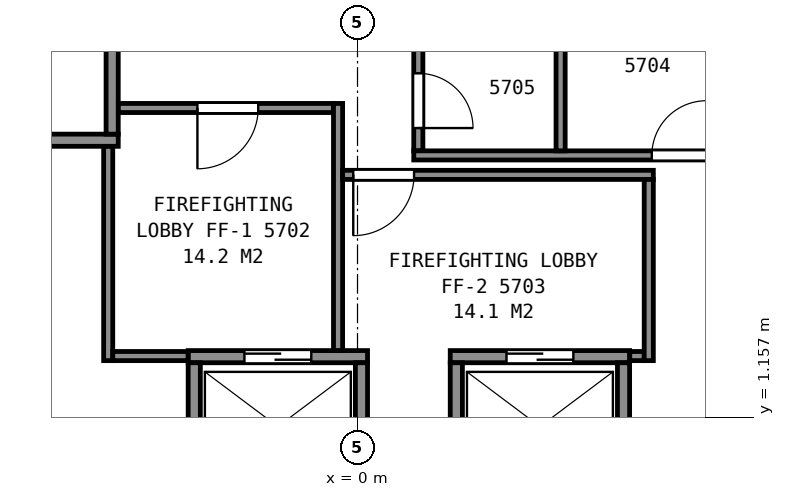
"""IFC4 building model, lengths in metres.
Left out: names, types, materials, properties, quantities, classifications, styles, units other than length and angle.
Written with IfcOpenShell. Run it as: python <this file> out.ifc"""

import sys

from ifc_helpers import new_model, si_unit, direction, frame, frame_2d, origin, place, context, subcontext, project, spatial, rectangle, extrude, element, fill, save


model = new_model("IFC4")
c1 = context("Model", 3, precision=1e-05, world=origin(), true_north=direction((0.0, 1.0)))
c2 = subcontext(c1, "Body", "Model", "MODEL_VIEW")
j1 = project(units=[si_unit("LENGTHUNIT", "METRE"), si_unit("PLANEANGLEUNIT", "RADIAN")], contexts=[c1])
p1 = place(None, origin())
s1 = spatial("IfcSite", under=j1, at=p1, CompositionType="ELEMENT")
p2 = place(p1, origin())
s2 = spatial("IfcBuilding", under=s1, at=p2, CompositionType="ELEMENT")
p3 = place(p2, frame((0.0, 0.0, 228.6)))
s3 = spatial("IfcBuildingStorey", under=s2, at=p3, CompositionType="ELEMENT", Elevation=228.6)
p4 = place(p3, frame((-2.785, 2.15, 0.0), z_axis=(0.0, 0.0, 1.0), x_axis=(1.0, 0.0, 0.0)))
e1 = element("IfcWall", 1, at=p4, inside=s3, PredefinedType="PARTITIONING", context=c2, shape_type="SweptSolid", body=[
    extrude(rectangle(XDim=2.95, YDim=0.2, at=frame_2d((1.475, 0.0))), origin(), (0.0, 0.0, 1.0), 3.7),
])
p5 = place(p4, frame((0.925, 0.0, 0.0)))
e2 = element("IfcOpeningElement", 2, at=p5, cuts=e1, PredefinedType="OPENING", context=c2, shape_type="SweptSolid", body=[
    extrude(rectangle(XDim=1.1, YDim=2.1, at=frame_2d((0.55, 1.05))), frame((0.0, 0.11, 0.0), z_axis=(0.0, -1.0, 0.0), x_axis=(1.0, 0.0, 0.0)), (0.0, 0.0, 1.0), 0.22),
])
p6 = place(p3, frame((1.525, 2.15, 0.0), z_axis=(0.0, 0.0, 1.0), x_axis=(1.0, 0.0, 0.0)))
e3 = element("IfcWall", 3, at=p6, inside=s3, PredefinedType="PARTITIONING", context=c2, shape_type="SweptSolid", body=[
    extrude(rectangle(XDim=2.95, YDim=0.2, at=frame_2d((1.475, 0.0))), origin(), (0.0, 0.0, 1.0), 3.7),
])
p7 = place(p6, frame((0.925, 0.0, 0.0)))
e4 = element("IfcOpeningElement", 4, at=p7, cuts=e3, PredefinedType="OPENING", context=c2, shape_type="SweptSolid", body=[
    extrude(rectangle(XDim=1.1, YDim=2.1, at=frame_2d((0.55, 1.05))), frame((0.0, 0.11, 0.0), z_axis=(0.0, -1.0, 0.0), x_axis=(1.0, 0.0, 0.0)), (0.0, 0.0, 1.0), 0.22),
])
p8 = place(p3, frame((-6.285, 5.71, 0.0), z_axis=(0.0, 0.0, 1.0), x_axis=(1.0, 0.0, 0.0)))
e5 = element("IfcWall", 5, at=p8, inside=s3, PredefinedType="PARTITIONING", context=c2, shape_type="SweptSolid", body=[
    extrude(rectangle(XDim=2.35, YDim=0.2, at=frame_2d((1.175, 0.0))), origin(), (0.0, 0.0, 1.0), 3.7),
])
p9 = place(p3, frame((5.663, -1.612, 0.0), z_axis=(0.0, 0.0, 1.0), x_axis=(0.49998122708, 0.866036242063, 0.0)))
e6 = element("IfcWall", 6, at=p9, inside=s3, PredefinedType="PARTITIONING", context=c2, shape_type="SweptSolid", body=[
    extrude(rectangle(XDim=4.9, YDim=0.2, at=frame_2d((2.45, 0.0))), origin(), (0.0, 0.0, 1.0), 3.7),
])
for number, where, z_axis, x_axis in (
    (7, (4.375, 0.1, 0.0), (0.0, 0.0, 1.0), (0.0, 1.0, 0.0)),
    (8, (1.625, 0.1, 0.0), (0.0, 0.0, 1.0), (0.0, 1.0, 0.0)),
    (9, (0.065, 0.1, 0.0), (0.0, 0.0, 1.0), (0.0, 1.0, 0.0)),
    (10, (-2.685, 0.1, 0.0), (0.0, 0.0, 1.0), (0.0, 1.0, 0.0)),
):
    element("IfcWall", number, at=place(p3, frame(where, z_axis=z_axis, x_axis=x_axis)), inside=s3, PredefinedType="PARTITIONING", context=c2, shape_type="SweptSolid", body=[
        extrude(rectangle(XDim=1.95, YDim=0.2, at=frame_2d((0.975, 0.0))), origin(), (0.0, 0.0, 1.0), 3.7),
    ])
p10 = place(p3, frame((-4.035, 5.81, 0.0), z_axis=(0.0, 0.0, 1.0), x_axis=(0.0, 1.0, 0.0)))
e11 = element("IfcWall", 11, at=p10, inside=s3, PredefinedType="PARTITIONING", context=c2, shape_type="SweptSolid", body=[
    extrude(rectangle(XDim=1.75, YDim=0.2, at=frame_2d((0.875, 0.0))), origin(), (0.0, 0.0, 1.0), 3.7),
])
p11 = place(p3, frame((-4.1, 2.085, 0.0), z_axis=(0.0, 0.0, 1.0), x_axis=(0.0, 1.0, 0.0)))
e12 = element("IfcWall", 12, at=p11, inside=s3, PredefinedType="PARTITIONING", context=c2, shape_type="SweptSolid", body=[
    extrude(rectangle(XDim=3.523, YDim=0.15, at=frame_2d((1.761, 0.0))), origin(), (0.0, 0.0, 1.0), 3.45),
])
p12 = place(p3, frame((-4.025, 2.16, 0.0), z_axis=(0.0, 0.0, 1.0), x_axis=(1.0, 0.0, 0.0)))
e13 = element("IfcWall", 13, at=p12, inside=s3, PredefinedType="PARTITIONING", context=c2, shape_type="SweptSolid", body=[
    extrude(rectangle(XDim=1.238, YDim=0.15, at=frame_2d((0.619, 0.0))), origin(), (0.0, 0.0, 1.0), 3.45),
])
p13 = place(p3, frame((-3.933, 6.24, 0.0), z_axis=(0.0, 0.0, 1.0), x_axis=(1.0, 0.0, 0.0)))
e14 = element("IfcWall", 14, at=p13, inside=s3, PredefinedType="PARTITIONING", context=c2, shape_type="SweptSolid", body=[
    extrude(rectangle(XDim=3.538, YDim=0.15, at=frame_2d((1.769, 0.0))), origin(), (0.0, 0.0, 1.0), 3.45),
])
p14 = place(p13, frame((1.3, 0.0, 0.0)))
e15 = element("IfcOpeningElement", 15, at=p14, cuts=e14, PredefinedType="OPENING", context=c2, shape_type="SweptSolid", body=[
    extrude(rectangle(XDim=1.0, YDim=2.1, at=frame_2d((0.5, 1.05))), frame((0.0, 0.085, 0.0), z_axis=(0.0, -1.0, 0.0), x_axis=(1.0, 0.0, 0.0)), (0.0, 0.0, 1.0), 0.17),
])
p15 = place(p3, frame((-0.32, 2.252, 0.0), z_axis=(0.0, 0.0, 1.0), x_axis=(0.0, 1.0, 0.0)))
e16 = element("IfcWall", 16, at=p15, inside=s3, PredefinedType="PARTITIONING", context=c2, shape_type="SweptSolid", body=[
    extrude(rectangle(XDim=4.063, YDim=0.15, at=frame_2d((2.031, 0.0))), origin(), (0.0, 0.0, 1.0), 3.45),
])
p16 = place(p3, frame((-0.245, 5.14, 0.0), z_axis=(0.0, 0.0, 1.0), x_axis=(1.0, 0.0, 0.0)))
e17 = element("IfcWall", 17, at=p16, inside=s3, PredefinedType="PARTITIONING", context=c2, shape_type="SweptSolid", body=[
    extrude(rectangle(XDim=5.11, YDim=0.15, at=frame_2d((2.555, 0.0))), origin(), (0.0, 0.0, 1.0), 3.45),
])
p17 = place(p16, frame((0.175, 0.0, 0.0)))
e18 = element("IfcOpeningElement", 18, at=p17, cuts=e17, PredefinedType="OPENING", context=c2, shape_type="SweptSolid", body=[
    extrude(rectangle(XDim=1.0, YDim=2.1, at=frame_2d((0.5, 1.05))), frame((0.0, 0.085, 0.0), z_axis=(0.0, -1.0, 0.0), x_axis=(1.0, 0.0, 0.0)), (0.0, 0.0, 1.0), 0.17),
])
p18 = place(p3, frame((1.0, 7.56, 0.0), z_axis=(0.0, 0.0, 1.0), x_axis=(0.0, -1.0, 0.0)))
e19 = element("IfcWall", 19, at=p18, inside=s3, PredefinedType="PARTITIONING", context=c2, shape_type="SweptSolid", body=[
    extrude(rectangle(XDim=2.025, YDim=0.15, at=frame_2d((1.013, 0.0))), origin(), (0.0, 0.0, 1.0), 3.45),
])
p19 = place(p18, frame((0.75, 0.0, 0.0)))
e20 = element("IfcOpeningElement", 20, at=p19, cuts=e19, PredefinedType="OPENING", context=c2, shape_type="SweptSolid", body=[
    extrude(rectangle(XDim=0.9, YDim=2.1, at=frame_2d((0.45, 1.05))), frame((0.0, 0.085, 0.0), z_axis=(0.0, -1.0, 0.0), x_axis=(1.0, 0.0, 0.0)), (0.0, 0.0, 1.0), 0.17),
])
p20 = place(p3, frame((0.925, 5.46, 0.0), z_axis=(0.0, 0.0, 1.0), x_axis=(1.0, 0.0, 0.0)))
e21 = element("IfcWall", 21, at=p20, inside=s3, PredefinedType="PARTITIONING", context=c2, shape_type="SweptSolid", body=[
    extrude(rectangle(XDim=5.22, YDim=0.15, at=frame_2d((2.61, 0.0))), origin(), (0.0, 0.0, 1.0), 3.45),
])
p21 = place(p20, frame((3.915, 0.0, 0.0)))
e22 = element("IfcOpeningElement", 22, at=p21, cuts=e21, PredefinedType="OPENING", context=c2, shape_type="SweptSolid", body=[
    extrude(rectangle(XDim=0.9, YDim=2.1, at=frame_2d((0.45, 1.05))), frame((0.0, 0.085, 0.0), z_axis=(0.0, -1.0, 0.0), x_axis=(1.0, 0.0, 0.0)), (0.0, 0.0, 1.0), 0.17),
])
p22 = place(p3, frame((3.34, 5.535, 0.0), z_axis=(0.0, 0.0, 1.0), x_axis=(0.0, 1.0, 0.0)))
e23 = element("IfcWall", 23, at=p22, inside=s3, PredefinedType="PARTITIONING", context=c2, shape_type="SweptSolid", body=[
    extrude(rectangle(XDim=2.025, YDim=0.15, at=frame_2d((1.013, 0.0))), origin(), (0.0, 0.0, 1.0), 3.45),
])
p23 = place(p3, frame((4.477, 2.16, 0.0), z_axis=(0.0, 0.0, 1.0), x_axis=(1.0, 0.0, 0.0)))
e24 = element("IfcWall", 24, at=p23, inside=s3, PredefinedType="PARTITIONING", context=c2, shape_type="SweptSolid", body=[
    extrude(rectangle(XDim=0.238, YDim=0.15, at=frame_2d((0.119, 0.0))), origin(), (0.0, 0.0, 1.0), 3.45),
])
p24 = place(p3, frame((4.79, 2.085, 0.0), z_axis=(0.0, 0.0, 1.0), x_axis=(0.0, 1.0, 0.0)))
e25 = element("IfcWall", 25, at=p24, inside=s3, PredefinedType="PARTITIONING", context=c2, shape_type="SweptSolid", body=[
    extrude(rectangle(XDim=2.98, YDim=0.15, at=frame_2d((1.49, 0.0))), origin(), (0.0, 0.0, 1.0), 3.45),
])
p25 = place(p3, frame((-4.075, -12.545, 0.0), z_axis=(0.0, 0.0, 1.0), x_axis=(-0.499997769292, 0.86602669168, 0.0)))
e26 = element("IfcWall", 26, at=p25, inside=s3, PredefinedType="PARTITIONING", context=c2, shape_type="SweptSolid", body=[
    extrude(rectangle(XDim=17.706, YDim=0.2, at=frame_2d((8.853, 0.0))), origin(), (0.0, 0.0, 1.0), 2.713),
])
p26 = place(p25, frame((14.138, 0.0, 0.0)))
e27 = element("IfcOpeningElement", 27, at=p26, cuts=e26, PredefinedType="OPENING", context=c2, shape_type="SweptSolid", body=[
    extrude(rectangle(XDim=0.9, YDim=2.1, at=frame_2d((0.45, 1.05))), frame((0.0, 0.11, 0.0), z_axis=(0.0, -1.0, 0.0), x_axis=(1.0, 0.0, 0.0)), (0.0, 0.0, 1.0), 0.22),
])
p27 = place(p25, frame((11.328, 0.0, 0.0)))
e28 = element("IfcOpeningElement", 28, at=p27, cuts=e26, PredefinedType="OPENING", context=c2, shape_type="SweptSolid", body=[
    extrude(rectangle(XDim=0.9, YDim=2.1, at=frame_2d((0.45, 1.05))), frame((0.0, 0.11, 0.0), z_axis=(0.0, -1.0, 0.0), x_axis=(1.0, 0.0, 0.0)), (0.0, 0.0, 1.0), 0.22),
])
p28 = place(p25, frame((5.454, 0.0, 0.0)))
e29 = element("IfcOpeningElement", 29, at=p28, cuts=e26, PredefinedType="OPENING", context=c2, shape_type="SweptSolid", body=[
    extrude(rectangle(XDim=0.9, YDim=2.1, at=frame_2d((0.45, 1.05))), frame((0.0, 0.11, 0.0), z_axis=(0.0, -1.0, 0.0), x_axis=(1.0, 0.0, 0.0)), (0.0, 0.0, 1.0), 0.22),
])
p29 = place(p25, frame((1.255, 0.0, 0.0)))
e30 = element("IfcOpeningElement", 30, at=p29, cuts=e26, PredefinedType="OPENING", context=c2, shape_type="SweptSolid", body=[
    extrude(rectangle(XDim=0.9, YDim=2.1, at=frame_2d((0.45, 1.05))), frame((0.0, 0.11, 0.0), z_axis=(0.0, -1.0, 0.0), x_axis=(1.0, 0.0, 0.0)), (0.0, 0.0, 1.0), 0.22),
])
p30 = place(p3, frame((12.903, 2.745, 0.0), z_axis=(0.0, 0.0, 1.0), x_axis=(-0.499999743747, -0.866025551732, 0.0)))
e31 = element("IfcWall", 31, at=p30, inside=s3, PredefinedType="PARTITIONING", context=c2, shape_type="SweptSolid", body=[
    extrude(rectangle(XDim=17.656, YDim=0.2, at=frame_2d((8.828, 0.0))), origin(), (0.0, 0.0, 1.0), 2.713),
])
p31 = place(p30, frame((10.134, 0.0, 0.0)))
e32 = element("IfcOpeningElement", 32, at=p31, cuts=e31, PredefinedType="OPENING", context=c2, shape_type="SweptSolid", body=[
    extrude(rectangle(XDim=0.9, YDim=2.1, at=frame_2d((0.45, 1.05))), frame((0.0, 0.11, 0.0), z_axis=(0.0, -1.0, 0.0), x_axis=(1.0, 0.0, 0.0)), (0.0, 0.0, 1.0), 0.22),
])
p32 = place(p30, frame((6.073, 0.0, 0.0)))
e33 = element("IfcOpeningElement", 33, at=p32, cuts=e31, PredefinedType="OPENING", context=c2, shape_type="SweptSolid", body=[
    extrude(rectangle(XDim=0.9, YDim=2.1, at=frame_2d((0.45, 1.05))), frame((0.0, 0.11, 0.0), z_axis=(0.0, -1.0, 0.0), x_axis=(1.0, 0.0, 0.0)), (0.0, 0.0, 1.0), 0.22),
])
p33 = place(p5, origin())
e34 = element("IfcDoor", 34, at=p33, inside=s3, OperationType="SLIDING_TO_LEFT", PredefinedType="DOOR", context=c2, shape_type="SweptSolid", body=[
    extrude(rectangle(XDim=1.1, YDim=2.1, at=frame_2d((0.55, 1.05))), frame((0.0, 0.025, 0.0), z_axis=(0.0, -1.0, 0.0), x_axis=(1.0, 0.0, 0.0)), (0.0, 0.0, 1.0), 0.05),
])
fill(e2, e34)
p34 = place(p7, origin())
e35 = element("IfcDoor", 35, at=p34, inside=s3, OperationType="SLIDING_TO_RIGHT", PredefinedType="DOOR", context=c2, shape_type="SweptSolid", body=[
    extrude(rectangle(XDim=1.1, YDim=2.1, at=frame_2d((0.55, 1.05))), frame((0.0, 0.025, 0.0), z_axis=(0.0, -1.0, 0.0), x_axis=(1.0, 0.0, 0.0)), (0.0, 0.0, 1.0), 0.05),
])
fill(e4, e35)
p35 = place(p14, origin())
e36 = element("IfcDoor", 36, at=p35, inside=s3, OperationType="SINGLE_SWING_LEFT", PredefinedType="DOOR", context=c2, shape_type="SweptSolid", body=[
    extrude(rectangle(XDim=1.0, YDim=2.1, at=frame_2d((0.5, 1.05))), frame((0.0, 0.025, 0.0), z_axis=(0.0, -1.0, 0.0), x_axis=(1.0, 0.0, 0.0)), (0.0, 0.0, 1.0), 0.05),
])
fill(e15, e36)
p36 = place(p17, origin())
e37 = element("IfcDoor", 37, at=p36, inside=s3, OperationType="SINGLE_SWING_LEFT", PredefinedType="DOOR", context=c2, shape_type="SweptSolid", body=[
    extrude(rectangle(XDim=1.0, YDim=2.1, at=frame_2d((0.5, 1.05))), frame((0.0, 0.025, 0.0), z_axis=(0.0, -1.0, 0.0), x_axis=(1.0, 0.0, 0.0)), (0.0, 0.0, 1.0), 0.05),
])
fill(e18, e37)
p37 = place(p19, origin())
e38 = element("IfcDoor", 38, at=p37, inside=s3, OperationType="SINGLE_SWING_RIGHT", PredefinedType="DOOR", context=c2, shape_type="SweptSolid", body=[
    extrude(rectangle(XDim=0.9, YDim=2.1, at=frame_2d((0.45, 1.05))), frame((0.0, 0.025, 0.0), z_axis=(0.0, -1.0, 0.0), x_axis=(1.0, 0.0, 0.0)), (0.0, 0.0, 1.0), 0.05),
])
fill(e20, e38)
p38 = place(p21, origin())
e39 = element("IfcDoor", 39, at=p38, inside=s3, OperationType="SINGLE_SWING_RIGHT", PredefinedType="DOOR", context=c2, shape_type="SweptSolid", body=[
    extrude(rectangle(XDim=0.9, YDim=2.1, at=frame_2d((0.45, 1.05))), frame((0.0, 0.025, 0.0), z_axis=(0.0, -1.0, 0.0), x_axis=(1.0, 0.0, 0.0)), (0.0, 0.0, 1.0), 0.05),
])
fill(e22, e39)
save(model, sys.argv[1])
